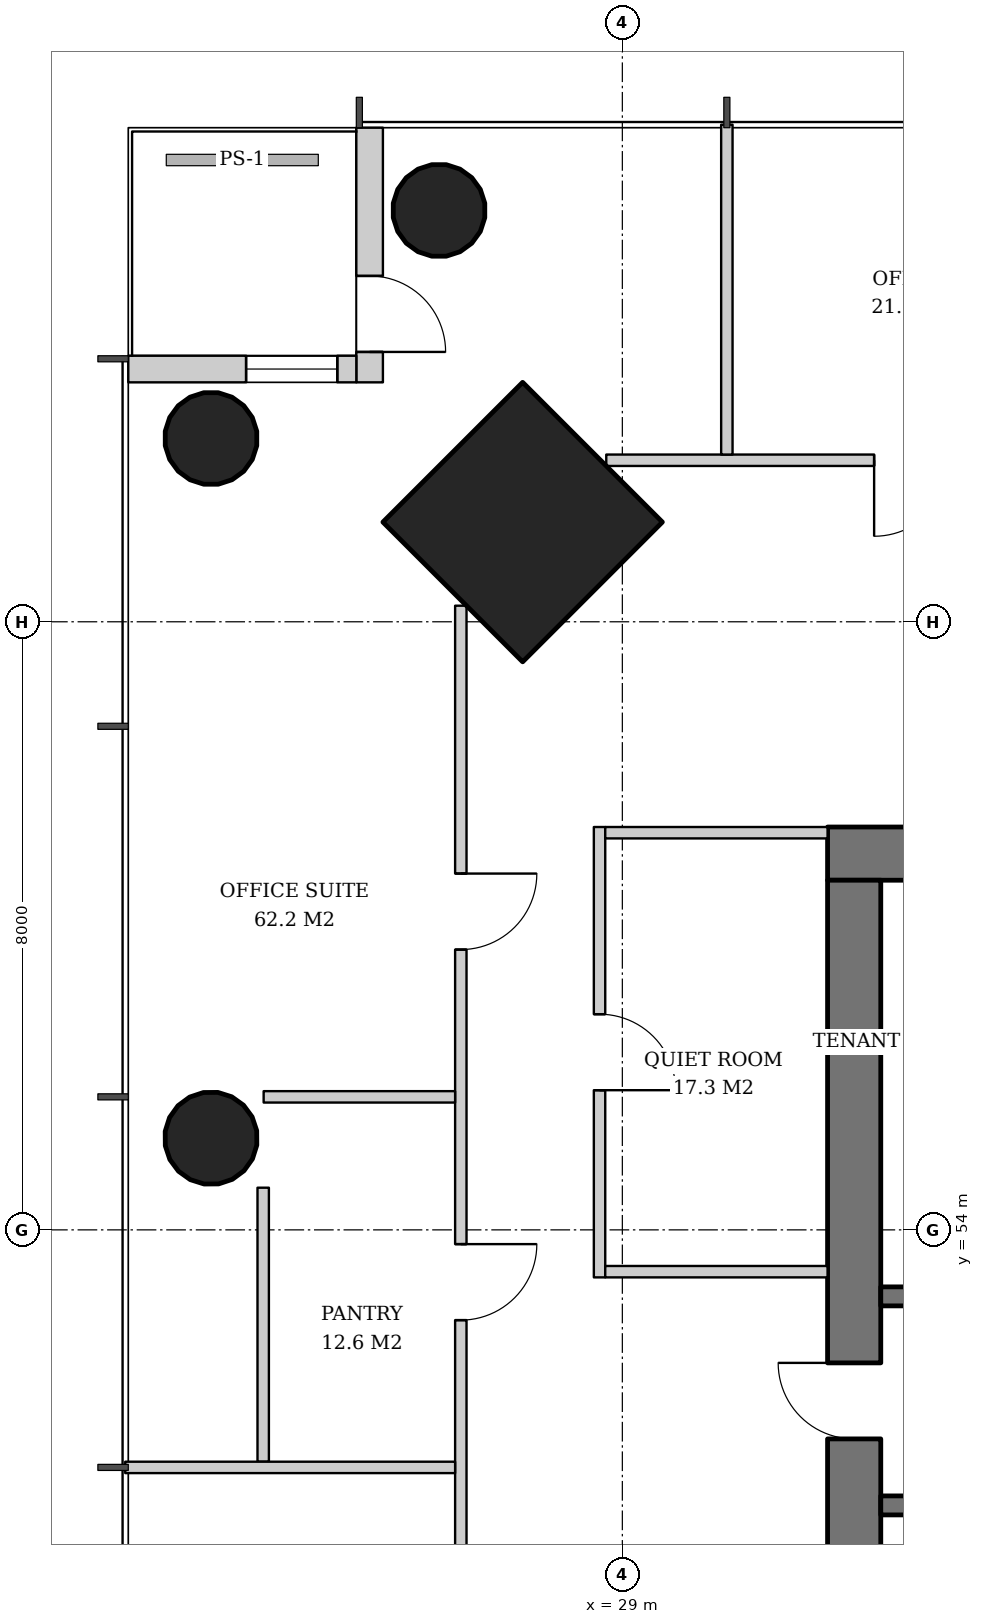
"""IFC4 building model, lengths in metres.
Left out: names, types, materials, properties, quantities, classifications, styles, units other than length and angle.
Written with IfcOpenShell. Run it as: python <this file> out.ifc"""

import sys

from ifc_helpers import new_model, si_unit, direction, frame, frame_2d, origin, origin_2d, place, context, subcontext, project, spatial, rectangle, hollow_circle, extrude, element, fill, save


model = new_model("IFC4")
c1 = context("Model", 3, precision=1e-05, world=origin(), true_north=direction((0.0, 1.0)))
c2 = subcontext(c1, "Body", "Model", "MODEL_VIEW")
j1 = project(units=[si_unit("LENGTHUNIT", "METRE"), si_unit("PLANEANGLEUNIT", "RADIAN")], contexts=[c1])
p1 = place(None, origin())
s1 = spatial("IfcSite", under=j1, at=p1, CompositionType="ELEMENT")
p2 = place(p1, origin())
s2 = spatial("IfcBuilding", under=s1, at=p2, CompositionType="ELEMENT")
p3 = place(p2, frame((0.0, 0.0, 100.8)))
s3 = spatial("IfcBuildingStorey", under=s2, at=p3, CompositionType="ELEMENT", Elevation=100.8)
p4 = place(p3, frame((27.65, 63.35, 0.0), z_axis=(0.031962158256, -0.031962158256, 0.998977898093), x_axis=(0.707106781187, 0.707106781187, 0.0)))
e1 = element("IfcColumn", 1, at=p4, inside=s3, PredefinedType="COLUMN", context=c2, shape_type="SweptSolid", body=[
    extrude(rectangle(XDim=2.6, YDim=2.6, at=origin_2d()), origin(), (0.0, 0.0, 1.0), 3.804),
])
for number, where, z_axis, x_axis in (
    (2, (26.55, 67.45, 0.0), (0.032, -0.032, 0.999), (0.707, 0.707, 0.0)),
    (3, (23.55, 64.45, 0.0), (0.032, -0.032, 0.999), (0.707, 0.707, 0.0)),
):
    element("IfcColumn", number, at=place(p3, frame(where, z_axis=z_axis, x_axis=x_axis)), inside=s3, PredefinedType="COLUMN", context=c2, shape_type="SweptSolid", body=[
        extrude(hollow_circle(Radius=0.61, WallThickness=0.04, at=origin_2d()), origin(), (0.0, 0.0, 1.0), 3.804),
    ])
p5 = place(p3, frame((23.55, 55.225, 0.0), z_axis=(0.031910269556, -0.015987237665, 0.999362868496), x_axis=(0.447933021895, 0.894067115991, 0.0)))
e4 = element("IfcColumn", 4, at=p5, inside=s3, PredefinedType="COLUMN", context=c2, shape_type="SweptSolid", body=[
    extrude(hollow_circle(Radius=0.61, WallThickness=0.04, at=origin_2d()), origin(), (0.0, 0.0, 1.0), 3.802),
])
p6 = place(p3, frame((31.7, 58.95, 0.0), z_axis=(0.0, 0.0, 1.0), x_axis=(1.0, 0.0, 0.0)))
e5 = element("IfcWall", 5, at=p6, inside=s3, PredefinedType="SHEAR", context=c2, shape_type="SweptSolid", body=[
    extrude(rectangle(XDim=26.6, YDim=0.7, at=frame_2d((13.3, 0.0))), origin(), (0.0, 0.0, 1.0), 3.8),
])
p7 = place(p6, frame((17.94, 0.0, 0.0)))
e6 = element("IfcOpeningElement", 6, at=p7, cuts=e5, PredefinedType="OPENING", context=c2, shape_type="SweptSolid", body=[
    extrude(rectangle(XDim=1.0, YDim=2.1, at=frame_2d((0.5, 1.05))), frame((0.0, 0.36, 0.0), z_axis=(0.0, -1.0, 0.0), x_axis=(1.0, 0.0, 0.0)), (0.0, 0.0, 1.0), 0.72),
])
p8 = place(p6, frame((5.825, 0.0, 0.0)))
e7 = element("IfcOpeningElement", 7, at=p8, cuts=e5, PredefinedType="OPENING", context=c2, shape_type="SweptSolid", body=[
    extrude(rectangle(XDim=1.0, YDim=2.1, at=frame_2d((0.5, 1.05))), frame((0.0, 0.36, 0.0), z_axis=(0.0, -1.0, 0.0), x_axis=(1.0, 0.0, 0.0)), (0.0, 0.0, 1.0), 0.72),
])
p9 = place(p6, frame((1.169, 0.0, 0.0)))
e8 = element("IfcOpeningElement", 8, at=p9, cuts=e5, PredefinedType="OPENING", context=c2, shape_type="SweptSolid", body=[
    extrude(rectangle(XDim=1.0, YDim=2.1, at=frame_2d((0.5, 1.05))), frame((0.0, 0.36, 0.0), z_axis=(0.0, -1.0, 0.0), x_axis=(1.0, 0.0, 0.0)), (0.0, 0.0, 1.0), 0.72),
])
p10 = place(p6, frame((3.447, 0.0, 0.0)))
e9 = element("IfcOpeningElement", 9, at=p10, cuts=e5, PredefinedType="OPENING", context=c2, shape_type="SweptSolid", body=[
    extrude(rectangle(XDim=1.0, YDim=2.1, at=frame_2d((0.5, 1.05))), frame((0.0, 0.36, 0.0), z_axis=(0.0, -1.0, 0.0), x_axis=(1.0, 0.0, 0.0)), (0.0, 0.0, 1.0), 0.72),
])
p11 = place(p6, frame((11.577, 0.0, 0.0)))
e10 = element("IfcOpeningElement", 10, at=p11, cuts=e5, PredefinedType="OPENING", context=c2, shape_type="SweptSolid", body=[
    extrude(rectangle(XDim=1.0, YDim=2.1, at=frame_2d((0.5, 1.05))), frame((0.0, 0.36, 0.0), z_axis=(0.0, -1.0, 0.0), x_axis=(1.0, 0.0, 0.0)), (0.0, 0.0, 1.0), 0.72),
])
p12 = place(p6, frame((20.9, 0.0, 0.0)))
e11 = element("IfcOpeningElement", 11, at=p12, cuts=e5, PredefinedType="OPENING", context=c2, shape_type="SweptSolid", body=[
    extrude(rectangle(XDim=1.0, YDim=2.1, at=frame_2d((0.5, 1.05))), frame((0.0, 0.36, 0.0), z_axis=(0.0, -1.0, 0.0), x_axis=(1.0, 0.0, 0.0)), (0.0, 0.0, 1.0), 0.72),
])
p13 = place(p6, frame((23.75, 0.0, 0.0)))
e12 = element("IfcOpeningElement", 12, at=p13, cuts=e5, PredefinedType="OPENING", context=c2, shape_type="SweptSolid", body=[
    extrude(rectangle(XDim=1.0, YDim=2.1, at=frame_2d((0.5, 1.05))), frame((0.0, 0.36, 0.0), z_axis=(0.0, -1.0, 0.0), x_axis=(1.0, 0.0, 0.0)), (0.0, 0.0, 1.0), 0.72),
])
p14 = place(p3, frame((32.05, 33.4, 0.0), z_axis=(0.0, 0.0, 1.0), x_axis=(0.0, 1.0, 0.0)))
e13 = element("IfcWall", 13, at=p14, inside=s3, PredefinedType="SHEAR", context=c2, shape_type="SweptSolid", body=[
    extrude(rectangle(XDim=25.2, YDim=0.7, at=frame_2d((12.6, 0.0))), origin(), (0.0, 0.0, 1.0), 3.8),
])
p15 = place(p14, frame((11.7, 0.0, 0.0)))
e14 = element("IfcOpeningElement", 14, at=p15, cuts=e13, PredefinedType="OPENING", context=c2, shape_type="SweptSolid", body=[
    extrude(rectangle(XDim=1.8, YDim=2.4, at=frame_2d((0.9, 1.2))), frame((0.0, 0.36, 0.0), z_axis=(0.0, -1.0, 0.0), x_axis=(1.0, 0.0, 0.0)), (0.0, 0.0, 1.0), 0.72),
])
p16 = place(p14, frame((3.6, 0.0, 0.0)))
e15 = element("IfcOpeningElement", 15, at=p16, cuts=e13, PredefinedType="OPENING", context=c2, shape_type="SweptSolid", body=[
    extrude(rectangle(XDim=1.0, YDim=2.1, at=frame_2d((0.5, 1.05))), frame((0.0, 0.36, 0.0), z_axis=(0.0, -1.0, 0.0), x_axis=(1.0, 0.0, 0.0)), (0.0, 0.0, 1.0), 0.72),
])
p17 = place(p14, frame((6.35, 0.0, 0.0)))
e16 = element("IfcOpeningElement", 16, at=p17, cuts=e13, PredefinedType="OPENING", context=c2, shape_type="SweptSolid", body=[
    extrude(rectangle(XDim=1.0, YDim=2.1, at=frame_2d((0.5, 1.05))), frame((0.0, 0.36, 0.0), z_axis=(0.0, -1.0, 0.0), x_axis=(1.0, 0.0, 0.0)), (0.0, 0.0, 1.0), 0.72),
])
p18 = place(p14, frame((9.1, 0.0, 0.0)))
e17 = element("IfcOpeningElement", 17, at=p18, cuts=e13, PredefinedType="OPENING", context=c2, shape_type="SweptSolid", body=[
    extrude(rectangle(XDim=1.0, YDim=2.1, at=frame_2d((0.5, 1.05))), frame((0.0, 0.36, 0.0), z_axis=(0.0, -1.0, 0.0), x_axis=(1.0, 0.0, 0.0)), (0.0, 0.0, 1.0), 0.72),
])
p19 = place(p14, frame((15.1, 0.0, 0.0)))
e18 = element("IfcOpeningElement", 18, at=p19, cuts=e13, PredefinedType="OPENING", context=c2, shape_type="SweptSolid", body=[
    extrude(rectangle(XDim=1.0, YDim=2.1, at=frame_2d((0.5, 1.05))), frame((0.0, 0.36, 0.0), z_axis=(0.0, -1.0, 0.0), x_axis=(1.0, 0.0, 0.0)), (0.0, 0.0, 1.0), 0.72),
])
p20 = place(p14, frame((17.85, 0.0, 0.0)))
e19 = element("IfcOpeningElement", 19, at=p20, cuts=e13, PredefinedType="OPENING", context=c2, shape_type="SweptSolid", body=[
    extrude(rectangle(XDim=1.0, YDim=2.1, at=frame_2d((0.5, 1.05))), frame((0.0, 0.36, 0.0), z_axis=(0.0, -1.0, 0.0), x_axis=(1.0, 0.0, 0.0)), (0.0, 0.0, 1.0), 0.72),
])
p21 = place(p3, frame((25.675, 68.5, 0.0), z_axis=(0.0, 0.0, 1.0), x_axis=(0.0, -1.0, 0.0)))
e20 = element("IfcWall", 20, at=p21, inside=s3, PredefinedType="SOLIDWALL", context=c2, shape_type="SweptSolid", body=[
    extrude(rectangle(XDim=3.35, YDim=0.35, at=frame_2d((1.675, 0.0))), origin(), (0.0, 0.0, 1.0), 3.62),
])
p22 = place(p21, frame((1.95, 0.0, 0.0)))
e21 = element("IfcOpeningElement", 21, at=p22, cuts=e20, PredefinedType="OPENING", context=c2, shape_type="SweptSolid", body=[
    extrude(rectangle(XDim=1.0, YDim=2.4, at=frame_2d((0.5, 1.2))), frame((0.0, 0.185, 0.0), z_axis=(0.0, -1.0, 0.0), x_axis=(1.0, 0.0, 0.0)), (0.0, 0.0, 1.0), 0.37),
])
p23 = place(p3, frame((25.5, 65.325, 0.0), z_axis=(0.0, 0.0, 1.0), x_axis=(-1.0, 0.0, 0.0)))
e22 = element("IfcWall", 22, at=p23, inside=s3, PredefinedType="SOLIDWALL", context=c2, shape_type="SweptSolid", body=[
    extrude(rectangle(XDim=3.0, YDim=0.35, at=frame_2d((1.5, 0.0))), origin(), (0.0, 0.0, 1.0), 3.62),
])
p24 = place(p23, frame((0.25, 0.0, 0.6)))
e23 = element("IfcOpeningElement", 23, at=p24, cuts=e22, PredefinedType="OPENING", context=c2, shape_type="SweptSolid", body=[
    extrude(rectangle(XDim=1.2, YDim=2.55, at=frame_2d((0.6, 1.275))), frame((0.0, 0.185, 0.0), z_axis=(0.0, -1.0, 0.0), x_axis=(1.0, 0.0, 0.0)), (0.0, 0.0, 1.0), 0.37),
])
for number, where, z_axis, x_axis in (
    (24, (32.4, 50.375, 0.0), (0.0, 0.0, 1.0), (1.0, 0.0, 0.0)),
    (25, (32.4, 53.125, 0.0), (0.0, 0.0, 1.0), (1.0, 0.0, 0.0)),
):
    element("IfcWall", number, at=place(p3, frame(where, z_axis=z_axis, x_axis=x_axis)), inside=s3, PredefinedType="SHEAR", context=c2, shape_type="SweptSolid", body=[
        extrude(rectangle(XDim=2.7, YDim=0.25, at=frame_2d((1.35, 0.0))), origin(), (0.0, 0.0, 1.0), 3.8),
    ])
p25 = place(p3, frame((28.7, 59.3, 0.0), z_axis=(0.0, 0.0, 1.0), x_axis=(0.0, -1.0, 0.0)))
e26 = element("IfcWall", 26, at=p25, inside=s3, PredefinedType="PARTITIONING", context=c2, shape_type="SweptSolid", body=[
    extrude(rectangle(XDim=5.925, YDim=0.15, at=frame_2d((2.962, 0.0))), origin(), (0.0, 0.0, 1.0), 2.72),
])
p26 = place(p25, frame((2.462, 0.0, 0.0)))
e27 = element("IfcOpeningElement", 27, at=p26, cuts=e26, PredefinedType="OPENING", context=c2, shape_type="SweptSolid", body=[
    extrude(rectangle(XDim=1.0, YDim=2.1, at=frame_2d((0.5, 1.05))), frame((0.0, 0.085, 0.0), z_axis=(0.0, -1.0, 0.0), x_axis=(1.0, 0.0, 0.0)), (0.0, 0.0, 1.0), 0.17),
])
for number, where, z_axis, x_axis in (
    (28, (31.7, 59.225, 0.0), (0.0, 0.0, 1.0), (-1.0, 0.0, 0.0)),
    (29, (31.7, 53.45, 0.0), (0.0, 0.0, 1.0), (-1.0, 0.0, 0.0)),
):
    element("IfcWall", number, at=place(p3, frame(where, z_axis=z_axis, x_axis=x_axis)), inside=s3, PredefinedType="PARTITIONING", context=c2, shape_type="SweptSolid", body=[
        extrude(rectangle(XDim=2.925, YDim=0.15, at=frame_2d((1.462, 0.0))), origin(), (0.0, 0.0, 1.0), 3.62),
    ])
p27 = place(p3, frame((61.211, 64.125, 0.0), z_axis=(0.0, 0.0, 1.0), x_axis=(-1.0, 0.0, 0.0)))
e30 = element("IfcWall", 30, at=p27, inside=s3, PredefinedType="PARTITIONING", context=c2, shape_type="SweptSolid", body=[
    extrude(rectangle(XDim=32.423, YDim=0.15, at=frame_2d((16.211, 0.0))), origin(), (0.0, 0.0, 1.0), 2.72),
])
p28 = place(p27, frame((3.524, 0.0, 0.0)))
e31 = element("IfcOpeningElement", 31, at=p28, cuts=e30, PredefinedType="OPENING", context=c2, shape_type="SweptSolid", body=[
    extrude(rectangle(XDim=1.0, YDim=2.1, at=frame_2d((0.5, 1.05))), frame((0.0, 0.085, 0.0), z_axis=(0.0, -1.0, 0.0), x_axis=(1.0, 0.0, 0.0)), (0.0, 0.0, 1.0), 0.17),
])
p29 = place(p27, frame((8.399, 0.0, 0.0)))
e32 = element("IfcOpeningElement", 32, at=p29, cuts=e30, PredefinedType="OPENING", context=c2, shape_type="SweptSolid", body=[
    extrude(rectangle(XDim=1.0, YDim=2.1, at=frame_2d((0.5, 1.05))), frame((0.0, 0.085, 0.0), z_axis=(0.0, -1.0, 0.0), x_axis=(1.0, 0.0, 0.0)), (0.0, 0.0, 1.0), 0.17),
])
p30 = place(p27, frame((13.274, 0.0, 0.0)))
e33 = element("IfcOpeningElement", 33, at=p30, cuts=e30, PredefinedType="OPENING", context=c2, shape_type="SweptSolid", body=[
    extrude(rectangle(XDim=1.0, YDim=2.1, at=frame_2d((0.5, 1.05))), frame((0.0, 0.085, 0.0), z_axis=(0.0, -1.0, 0.0), x_axis=(1.0, 0.0, 0.0)), (0.0, 0.0, 1.0), 0.17),
])
p31 = place(p27, frame((18.149, 0.0, 0.0)))
e34 = element("IfcOpeningElement", 34, at=p31, cuts=e30, PredefinedType="OPENING", context=c2, shape_type="SweptSolid", body=[
    extrude(rectangle(XDim=1.0, YDim=2.1, at=frame_2d((0.5, 1.05))), frame((0.0, 0.085, 0.0), z_axis=(0.0, -1.0, 0.0), x_axis=(1.0, 0.0, 0.0)), (0.0, 0.0, 1.0), 0.17),
])
p32 = place(p27, frame((23.024, 0.0, 0.0)))
e35 = element("IfcOpeningElement", 35, at=p32, cuts=e30, PredefinedType="OPENING", context=c2, shape_type="SweptSolid", body=[
    extrude(rectangle(XDim=1.0, YDim=2.1, at=frame_2d((0.5, 1.05))), frame((0.0, 0.085, 0.0), z_axis=(0.0, -1.0, 0.0), x_axis=(1.0, 0.0, 0.0)), (0.0, 0.0, 1.0), 0.17),
])
p33 = place(p27, frame((27.899, 0.0, 0.0)))
e36 = element("IfcOpeningElement", 36, at=p33, cuts=e30, PredefinedType="OPENING", context=c2, shape_type="SweptSolid", body=[
    extrude(rectangle(XDim=1.0, YDim=2.1, at=frame_2d((0.5, 1.05))), frame((0.0, 0.085, 0.0), z_axis=(0.0, -1.0, 0.0), x_axis=(1.0, 0.0, 0.0)), (0.0, 0.0, 1.0), 0.17),
])
p34 = place(p3, frame((30.375, 64.2, 0.0), z_axis=(0.0, 0.0, 1.0), x_axis=(0.0, 1.0, 0.0)))
e37 = element("IfcWall", 37, at=p34, inside=s3, PredefinedType="PARTITIONING", context=c2, shape_type="SweptSolid", body=[
    extrude(rectangle(XDim=4.34, YDim=0.15, at=frame_2d((2.17, 0.0))), origin(), (0.0, 0.0, 1.0), 2.82),
])
p35 = place(p3, frame((24.275, 54.555, 0.0), z_axis=(0.0, 0.0, 1.0), x_axis=(0.0, -1.0, 0.0)))
e38 = element("IfcWall", 38, at=p35, inside=s3, PredefinedType="PARTITIONING", context=c2, shape_type="SweptSolid", body=[
    extrude(rectangle(XDim=3.605, YDim=0.15, at=frame_2d((1.802, 0.0))), origin(), (0.0, 0.0, 1.0), 2.858),
])
p36 = place(p3, frame((26.875, 62.211, 0.0), z_axis=(0.0, 0.0, 1.0), x_axis=(0.0, -1.0, 0.0)))
e39 = element("IfcWall", 39, at=p36, inside=s3, PredefinedType="PARTITIONING", context=c2, shape_type="SweptSolid", body=[
    extrude(rectangle(XDim=32.423, YDim=0.15, at=frame_2d((16.211, 0.0))), origin(), (0.0, 0.0, 1.0), 2.72),
])
p37 = place(p36, frame((3.524, 0.0, 0.0)))
e40 = element("IfcOpeningElement", 40, at=p37, cuts=e39, PredefinedType="OPENING", context=c2, shape_type="SweptSolid", body=[
    extrude(rectangle(XDim=1.0, YDim=2.1, at=frame_2d((0.5, 1.05))), frame((0.0, 0.085, 0.0), z_axis=(0.0, -1.0, 0.0), x_axis=(1.0, 0.0, 0.0)), (0.0, 0.0, 1.0), 0.17),
])
p38 = place(p36, frame((8.399, 0.0, 0.0)))
e41 = element("IfcOpeningElement", 41, at=p38, cuts=e39, PredefinedType="OPENING", context=c2, shape_type="SweptSolid", body=[
    extrude(rectangle(XDim=1.0, YDim=2.1, at=frame_2d((0.5, 1.05))), frame((0.0, 0.085, 0.0), z_axis=(0.0, -1.0, 0.0), x_axis=(1.0, 0.0, 0.0)), (0.0, 0.0, 1.0), 0.17),
])
p39 = place(p36, frame((13.274, 0.0, 0.0)))
e42 = element("IfcOpeningElement", 42, at=p39, cuts=e39, PredefinedType="OPENING", context=c2, shape_type="SweptSolid", body=[
    extrude(rectangle(XDim=1.0, YDim=2.1, at=frame_2d((0.5, 1.05))), frame((0.0, 0.085, 0.0), z_axis=(0.0, -1.0, 0.0), x_axis=(1.0, 0.0, 0.0)), (0.0, 0.0, 1.0), 0.17),
])
p40 = place(p36, frame((18.249, 0.0, 0.0)))
e43 = element("IfcOpeningElement", 43, at=p40, cuts=e39, PredefinedType="OPENING", context=c2, shape_type="SweptSolid", body=[
    extrude(rectangle(XDim=0.8, YDim=2.1, at=frame_2d((0.4, 1.05))), frame((0.0, 0.085, 0.0), z_axis=(0.0, -1.0, 0.0), x_axis=(1.0, 0.0, 0.0)), (0.0, 0.0, 1.0), 0.17),
])
p41 = place(p36, frame((23.024, 0.0, 0.0)))
e44 = element("IfcOpeningElement", 44, at=p41, cuts=e39, PredefinedType="OPENING", context=c2, shape_type="SweptSolid", body=[
    extrude(rectangle(XDim=1.0, YDim=2.1, at=frame_2d((0.5, 1.05))), frame((0.0, 0.085, 0.0), z_axis=(0.0, -1.0, 0.0), x_axis=(1.0, 0.0, 0.0)), (0.0, 0.0, 1.0), 0.17),
])
p42 = place(p36, frame((27.999, 0.0, 0.0)))
e45 = element("IfcOpeningElement", 45, at=p42, cuts=e39, PredefinedType="OPENING", context=c2, shape_type="SweptSolid", body=[
    extrude(rectangle(XDim=0.8, YDim=2.1, at=frame_2d((0.4, 1.05))), frame((0.0, 0.085, 0.0), z_axis=(0.0, -1.0, 0.0), x_axis=(1.0, 0.0, 0.0)), (0.0, 0.0, 1.0), 0.17),
])
p43 = place(p3, frame((26.8, 55.75, 0.0), z_axis=(0.0, 0.0, 1.0), x_axis=(-1.0, 0.0, 0.0)))
e46 = element("IfcWall", 46, at=p43, inside=s3, PredefinedType="PARTITIONING", context=c2, shape_type="SweptSolid", body=[
    extrude(rectangle(XDim=2.519, YDim=0.15, at=frame_2d((1.26, 0.0))), origin(), (0.0, 0.0, 1.0), 3.62),
])
p44 = place(p3, frame((26.8, 50.875, 0.0), z_axis=(0.0, 0.0, 1.0), x_axis=(-1.0, 0.0, 0.0)))
e47 = element("IfcWall", 47, at=p44, inside=s3, PredefinedType="PARTITIONING", context=c2, shape_type="SweptSolid", body=[
    extrude(rectangle(XDim=4.34, YDim=0.15, at=frame_2d((2.17, 0.0))), origin(), (0.0, 0.0, 1.0), 2.82),
])
p45 = place(p22, origin())
e48 = element("IfcDoor", 48, at=p45, inside=s3, OperationType="SINGLE_SWING_RIGHT", PredefinedType="DOOR", context=c2, shape_type="SweptSolid", body=[
    extrude(rectangle(XDim=1.0, YDim=2.4, at=frame_2d((0.5, 1.2))), frame((0.0, 0.025, 0.0), z_axis=(0.0, -1.0, 0.0), x_axis=(1.0, 0.0, 0.0)), (0.0, 0.0, 1.0), 0.05),
])
fill(e21, e48)
p46 = place(p24, origin())
e49 = element("IfcWindow", 49, at=p46, inside=s3, PartitioningType="SINGLE_PANEL", PredefinedType="WINDOW", context=c2, shape_type="SweptSolid", body=[
    extrude(rectangle(XDim=1.2, YDim=2.55, at=frame_2d((0.6, 1.275))), frame((0.0, 0.03, 0.0), z_axis=(0.0, -1.0, 0.0), x_axis=(1.0, 0.0, 0.0)), (0.0, 0.0, 1.0), 0.06),
])
fill(e23, e49)
p47 = place(p20, origin())
e50 = element("IfcDoor", 50, at=p47, inside=s3, OperationType="SINGLE_SWING_RIGHT", PredefinedType="DOOR", context=c2, shape_type="SweptSolid", body=[
    extrude(rectangle(XDim=1.0, YDim=2.1, at=frame_2d((0.5, 1.05))), frame((0.0, -0.29, 0.0), z_axis=(0.0, -1.0, 0.0), x_axis=(1.0, 0.0, 0.0)), (0.0, 0.0, 1.0), 0.05),
])
fill(e19, e50)
p48 = place(p26, origin())
e51 = element("IfcDoor", 51, at=p48, inside=s3, OperationType="SINGLE_SWING_RIGHT", PredefinedType="DOOR", context=c2, shape_type="SweptSolid", body=[
    extrude(rectangle(XDim=1.0, YDim=2.1, at=frame_2d((0.5, 1.05))), frame((0.0, 0.025, 0.0), z_axis=(0.0, -1.0, 0.0), x_axis=(1.0, 0.0, 0.0)), (0.0, 0.0, 1.0), 0.05),
])
fill(e27, e51)
p49 = place(p33, origin())
e52 = element("IfcDoor", 52, at=p49, inside=s3, OperationType="SINGLE_SWING_RIGHT", PredefinedType="DOOR", context=c2, shape_type="SweptSolid", body=[
    extrude(rectangle(XDim=1.0, YDim=2.1, at=frame_2d((0.5, 1.05))), frame((0.0, 0.025, 0.0), z_axis=(0.0, -1.0, 0.0), x_axis=(1.0, 0.0, 0.0)), (0.0, 0.0, 1.0), 0.05),
])
fill(e36, e52)
p50 = place(p37, origin())
e53 = element("IfcDoor", 53, at=p50, inside=s3, OperationType="SINGLE_SWING_LEFT", PredefinedType="DOOR", context=c2, shape_type="SweptSolid", body=[
    extrude(rectangle(XDim=1.0, YDim=2.1, at=frame_2d((0.5, 1.05))), frame((0.0, 0.025, 0.0), z_axis=(0.0, -1.0, 0.0), x_axis=(1.0, 0.0, 0.0)), (0.0, 0.0, 1.0), 0.05),
])
fill(e40, e53)
p51 = place(p38, origin())
e54 = element("IfcDoor", 54, at=p51, inside=s3, OperationType="SINGLE_SWING_LEFT", PredefinedType="DOOR", context=c2, shape_type="SweptSolid", body=[
    extrude(rectangle(XDim=1.0, YDim=2.1, at=frame_2d((0.5, 1.05))), frame((0.0, 0.025, 0.0), z_axis=(0.0, -1.0, 0.0), x_axis=(1.0, 0.0, 0.0)), (0.0, 0.0, 1.0), 0.05),
])
fill(e41, e54)
save(model, sys.argv[1])
